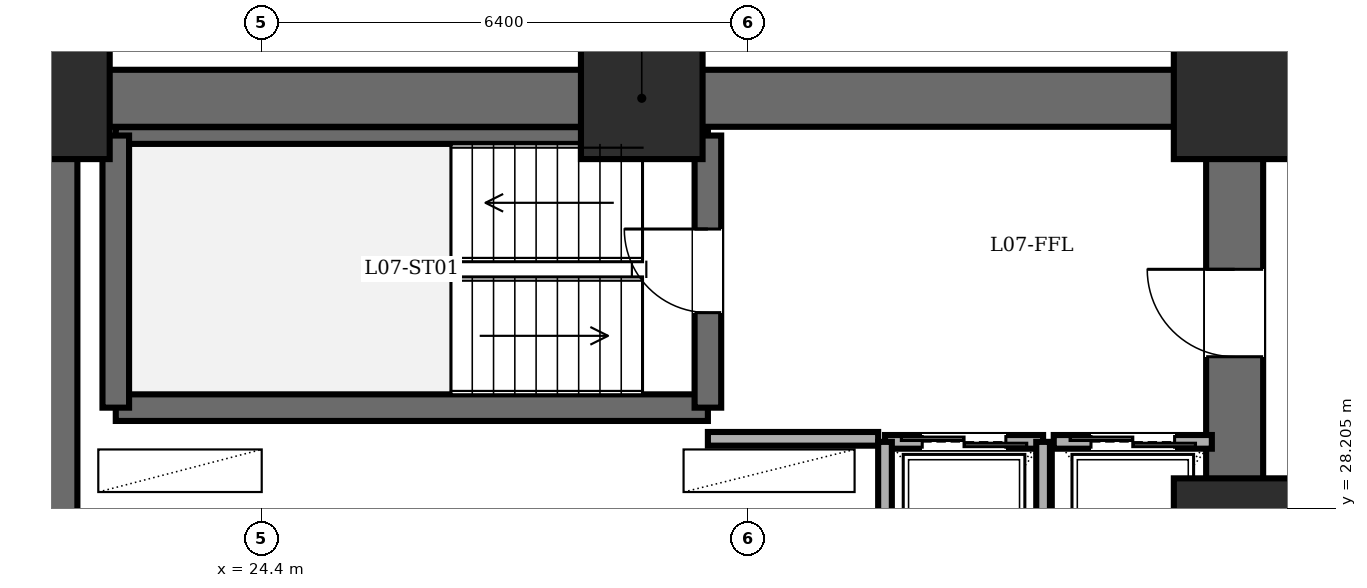
"""IFC4 building model, lengths in metres.
Left out: names, types, materials, properties, quantities, classifications, styles, units other than length and angle.
Written with IfcOpenShell. Run it as: python <this file> out.ifc"""

import sys

from ifc_helpers import new_model, si_unit, direction, frame, frame_2d, origin, origin_2d, place, context, subcontext, project, spatial, rectangle, extrude, element, fill, save


model = new_model("IFC4")
c1 = context("Model", 3, precision=1e-05, world=origin(), true_north=direction((0.0, 1.0)))
c2 = subcontext(c1, "Body", "Model", "MODEL_VIEW")
j1 = project(units=[si_unit("LENGTHUNIT", "METRE"), si_unit("PLANEANGLEUNIT", "RADIAN")], contexts=[c1])
p1 = place(None, origin())
s1 = spatial("IfcSite", under=j1, at=p1, CompositionType="ELEMENT")
p2 = place(p1, origin())
s2 = spatial("IfcBuilding", under=s1, at=p2, CompositionType="ELEMENT")
p3 = place(p2, frame((0.0, 0.0, 28.8)))
s3 = spatial("IfcBuildingStorey", under=s2, at=p3, CompositionType="ELEMENT", Elevation=28.8)
for number, where, z_axis, x_axis in (
    (1, (37.2, 27.8, 0.0), (0.0, 0.0, 1.0), (1.0, 0.0, 0.0)),
    (2, (37.2, 33.6, 0.0), (0.0, 0.0, 1.0), (1.0, 0.0, 0.0)),
    (3, (29.4, 33.6, 0.0), (0.0, 0.0, 1.0), (1.0, 0.0, 0.0)),
    (4, (21.6, 33.6, 0.0), (0.0, 0.0, 1.0), (1.0, 0.0, 0.0)),
):
    element("IfcColumn", number, at=place(p3, frame(where, z_axis=z_axis, x_axis=x_axis)), inside=s3, PredefinedType="COLUMN", context=c2, shape_type="SweptSolid", body=[
        extrude(rectangle(XDim=1.6, YDim=1.6, at=origin_2d()), origin(), (0.0, 0.0, 1.0), 3.6),
    ])
p4 = place(p3, frame((21.6, 14.4, 0.0), z_axis=(0.0, 0.0, 1.0), x_axis=(0.0, 1.0, 0.0)))
e5 = element("IfcWall", 5, at=p4, inside=s3, PredefinedType="SHEAR", context=c2, shape_type="SweptSolid", body=[
    extrude(rectangle(XDim=19.2, YDim=0.75, at=frame_2d((9.6, 0.0))), origin(), (0.0, 0.0, 1.0), 3.4),
])
p5 = place(p3, frame((21.6, 33.6, 0.0), z_axis=(0.0, 0.0, 1.0), x_axis=(1.0, 0.0, 0.0)))
e6 = element("IfcWall", 6, at=p5, inside=s3, PredefinedType="SHEAR", context=c2, shape_type="SweptSolid", body=[
    extrude(rectangle(XDim=15.6, YDim=0.75, at=frame_2d((7.8, 0.0))), origin(), (0.0, 0.0, 1.0), 3.4),
])
p6 = place(p3, frame((37.2, 14.4, 0.0), z_axis=(0.0, 0.0, 1.0), x_axis=(0.0, 1.0, 0.0)))
e7 = element("IfcWall", 7, at=p6, inside=s3, PredefinedType="SHEAR", context=c2, shape_type="SweptSolid", body=[
    extrude(rectangle(XDim=19.2, YDim=0.75, at=frame_2d((9.6, 0.0))), origin(), (0.0, 0.0, 1.0), 3.4),
])
p7 = place(p6, frame((15.8, 0.0, 0.0)))
e8 = element("IfcOpeningElement", 8, at=p7, cuts=e7, PredefinedType="OPENING", context=c2, shape_type="SweptSolid", body=[
    extrude(rectangle(XDim=1.15, YDim=2.15, at=frame_2d((0.575, 1.075))), frame((0.0, 0.385, 0.0), z_axis=(0.0, -1.0, 0.0), x_axis=(1.0, 0.0, 0.0)), (0.0, 0.0, 1.0), 0.77),
])
p8 = place(p6, frame((3.6, 0.0, 0.0)))
e9 = element("IfcOpeningElement", 9, at=p8, cuts=e7, PredefinedType="OPENING", context=c2, shape_type="SweptSolid", body=[
    extrude(rectangle(XDim=1.1, YDim=2.15, at=frame_2d((0.55, 1.075))), frame((0.0, 0.385, 0.0), z_axis=(0.0, -1.0, 0.0), x_axis=(1.0, 0.0, 0.0)), (0.0, 0.0, 1.0), 0.77),
])
p9 = place(p6, frame((8.6, 0.0, 0.0)))
e10 = element("IfcOpeningElement", 10, at=p9, cuts=e7, PredefinedType="OPENING", context=c2, shape_type="SweptSolid", body=[
    extrude(rectangle(XDim=1.3, YDim=2.2, at=frame_2d((0.65, 1.1))), frame((0.0, 0.385, 0.0), z_axis=(0.0, -1.0, 0.0), x_axis=(1.0, 0.0, 0.0)), (0.0, 0.0, 1.0), 0.77),
])
p10 = place(p3, frame((22.48, 29.53, 0.0), z_axis=(0.0, 0.0, 1.0), x_axis=(1.0, 0.0, 0.0)))
e11 = element("IfcWall", 11, at=p10, inside=s3, PredefinedType="SOLIDWALL", context=c2, shape_type="SweptSolid", body=[
    extrude(rectangle(XDim=7.79, YDim=0.35, at=frame_2d((3.895, 0.0))), origin(), (0.0, 0.0, 1.0), 3.4),
])
p11 = place(p3, frame((22.48, 33.11, 0.0), z_axis=(0.0, 0.0, 1.0), x_axis=(1.0, 0.0, 0.0)))
e12 = element("IfcWall", 12, at=p11, inside=s3, PredefinedType="PARTITIONING", context=c2, shape_type="SweptSolid", body=[
    extrude(rectangle(XDim=7.79, YDim=0.22, at=frame_2d((3.895, 0.0))), origin(), (0.0, 0.0, 1.0), 3.4),
])
p12 = place(p3, frame((22.48, 29.53, 0.0), z_axis=(0.0, 0.0, 1.0), x_axis=(0.0, 1.0, 0.0)))
e13 = element("IfcWall", 13, at=p12, inside=s3, PredefinedType="SOLIDWALL", context=c2, shape_type="SweptSolid", body=[
    extrude(rectangle(XDim=3.58, YDim=0.35, at=frame_2d((1.79, 0.0))), origin(), (0.0, 0.0, 1.0), 3.4),
])
p13 = place(p3, frame((30.27, 29.53, 0.0), z_axis=(0.0, 0.0, 1.0), x_axis=(0.0, 1.0, 0.0)))
e14 = element("IfcWall", 14, at=p13, inside=s3, PredefinedType="SOLIDWALL", context=c2, shape_type="SweptSolid", body=[
    extrude(rectangle(XDim=3.58, YDim=0.35, at=frame_2d((1.79, 0.0))), origin(), (0.0, 0.0, 1.0), 3.4),
])
p14 = place(p13, frame((1.25, 0.0, 0.0)))
e15 = element("IfcOpeningElement", 15, at=p14, cuts=e14, PredefinedType="OPENING", context=c2, shape_type="SweptSolid", body=[
    extrude(rectangle(XDim=1.1, YDim=2.15, at=frame_2d((0.55, 1.075))), frame((0.0, 0.185, 0.0), z_axis=(0.0, -1.0, 0.0), x_axis=(1.0, 0.0, 0.0)), (0.0, 0.0, 1.0), 0.37),
])
p15 = place(p3, frame((30.27, 29.12, 0.0), z_axis=(0.0, 0.0, 1.0), x_axis=(1.0, 0.0, 0.0)))
e16 = element("IfcWall", 16, at=p15, inside=s3, PredefinedType="PARTITIONING", context=c2, shape_type="SweptSolid", body=[
    extrude(rectangle(XDim=2.24, YDim=0.18, at=frame_2d((1.12, 0.0))), origin(), (0.0, 0.0, 1.0), 3.4),
])
p16 = place(p3, frame((32.6, 29.08, 0.0), z_axis=(0.0, 0.0, 1.0), x_axis=(1.0, 0.0, 0.0)))
e17 = element("IfcWall", 17, at=p16, inside=s3, PredefinedType="PARTITIONING", context=c2, shape_type="SweptSolid", body=[
    extrude(rectangle(XDim=2.08, YDim=0.18, at=frame_2d((1.04, 0.0))), origin(), (0.0, 0.0, 1.0), 3.4),
])
p17 = place(p16, frame((0.49, 0.0, 0.0)))
e18 = element("IfcOpeningElement", 18, at=p17, cuts=e17, PredefinedType="OPENING", context=c2, shape_type="SweptSolid", body=[
    extrude(rectangle(XDim=1.1, YDim=2.2, at=frame_2d((0.55, 1.1))), frame((0.0, 0.1, 0.0), z_axis=(0.0, -1.0, 0.0), x_axis=(1.0, 0.0, 0.0)), (0.0, 0.0, 1.0), 0.2),
])
for number, where, z_axis, x_axis in (
    (19, (34.68, 26.35, 0.0), (0.0, 0.0, 1.0), (0.0, 1.0, 0.0)),
    (20, (32.6, 29.08, 0.0), (0.0, 0.0, 1.0), (0.0, -1.0, 0.0)),
):
    element("IfcWall", number, at=place(p3, frame(where, z_axis=z_axis, x_axis=x_axis)), inside=s3, PredefinedType="PARTITIONING", context=c2, shape_type="SweptSolid", body=[
        extrude(rectangle(XDim=2.73, YDim=0.18, at=frame_2d((1.365, 0.0))), origin(), (0.0, 0.0, 1.0), 3.4),
    ])
p18 = place(p3, frame((34.82, 29.08, 0.0), z_axis=(0.0, 0.0, 1.0), x_axis=(1.0, 0.0, 0.0)))
e21 = element("IfcWall", 21, at=p18, inside=s3, PredefinedType="PARTITIONING", context=c2, shape_type="SweptSolid", body=[
    extrude(rectangle(XDim=2.08, YDim=0.18, at=frame_2d((1.04, 0.0))), origin(), (0.0, 0.0, 1.0), 3.4),
])
p19 = place(p18, frame((0.49, 0.0, 0.0)))
e22 = element("IfcOpeningElement", 22, at=p19, cuts=e21, PredefinedType="OPENING", context=c2, shape_type="SweptSolid", body=[
    extrude(rectangle(XDim=1.1, YDim=2.2, at=frame_2d((0.55, 1.1))), frame((0.0, 0.1, 0.0), z_axis=(0.0, -1.0, 0.0), x_axis=(1.0, 0.0, 0.0)), (0.0, 0.0, 1.0), 0.2),
])
p20 = place(p14, origin())
e23 = element("IfcDoor", 23, at=p20, inside=s3, OperationType="SINGLE_SWING_RIGHT", PredefinedType="DOOR", context=c2, shape_type="SweptSolid", body=[
    extrude(rectangle(XDim=1.1, YDim=2.15, at=frame_2d((0.55, 1.075))), frame((0.0, 0.025, 0.0), z_axis=(0.0, -1.0, 0.0), x_axis=(1.0, 0.0, 0.0)), (0.0, 0.0, 1.0), 0.05),
])
fill(e15, e23)
p21 = place(p7, origin())
e24 = element("IfcDoor", 24, at=p21, inside=s3, OperationType="SINGLE_SWING_RIGHT", PredefinedType="DOOR", context=c2, shape_type="SweptSolid", body=[
    extrude(rectangle(XDim=1.15, YDim=2.15, at=frame_2d((0.575, 1.075))), frame((0.0, 0.025, 0.0), z_axis=(0.0, -1.0, 0.0), x_axis=(1.0, 0.0, 0.0)), (0.0, 0.0, 1.0), 0.05),
])
fill(e8, e24)
p22 = place(p17, origin())
e25 = element("IfcDoor", 25, at=p22, inside=s3, OperationType="DOUBLE_DOOR_SLIDING", PredefinedType="DOOR", context=c2, shape_type="SweptSolid", body=[
    extrude(rectangle(XDim=1.1, YDim=2.2, at=frame_2d((0.55, 1.1))), frame((0.0, 0.025, 0.0), z_axis=(0.0, -1.0, 0.0), x_axis=(1.0, 0.0, 0.0)), (0.0, 0.0, 1.0), 0.05),
])
fill(e18, e25)
p23 = place(p19, origin())
e26 = element("IfcDoor", 26, at=p23, inside=s3, OperationType="DOUBLE_DOOR_SLIDING", PredefinedType="DOOR", context=c2, shape_type="SweptSolid", body=[
    extrude(rectangle(XDim=1.1, YDim=2.2, at=frame_2d((0.55, 1.1))), frame((0.0, 0.025, 0.0), z_axis=(0.0, -1.0, 0.0), x_axis=(1.0, 0.0, 0.0)), (0.0, 0.0, 1.0), 0.05),
])
fill(e22, e26)
save(model, sys.argv[1])
